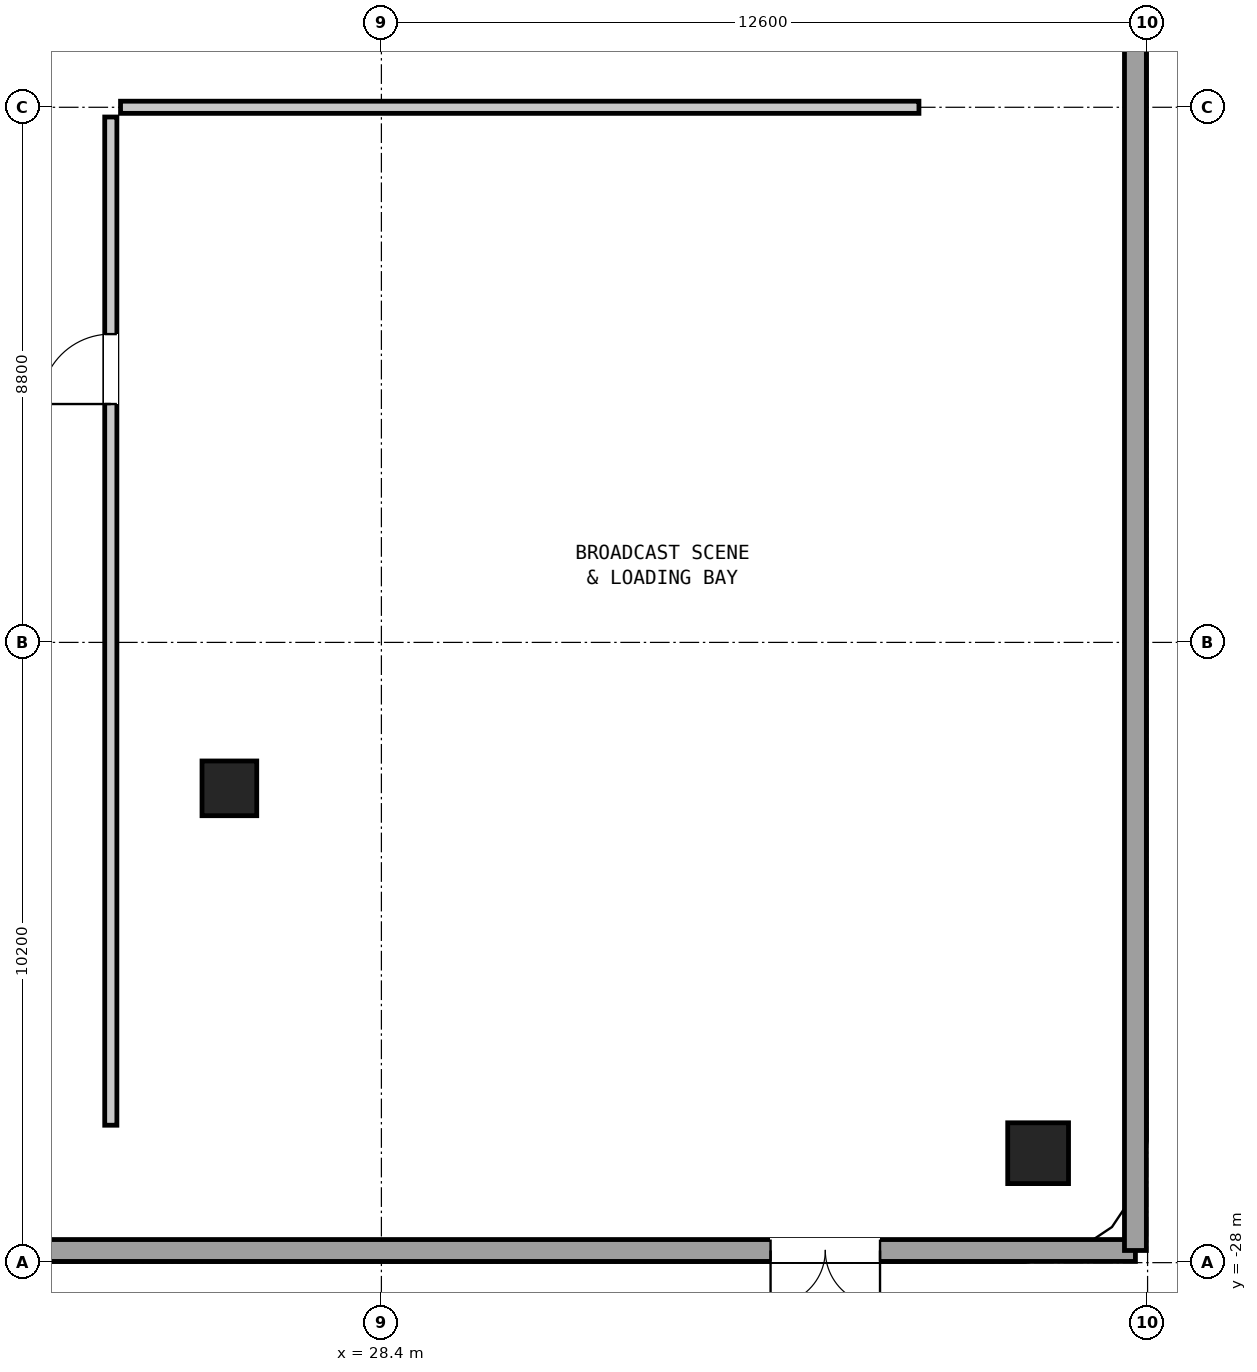
"""IFC4 building model, lengths in metres.
Left out: names, types, materials, properties, quantities, classifications, styles, units other than length and angle.
Written with IfcOpenShell. Run it as: python <this file> out.ifc"""

import sys

from ifc_helpers import new_model, si_unit, direction, frame, frame_2d, origin, origin_2d, place, context, subcontext, project, spatial, rectangle, hollow_rectangle, extrude, element, fill, save


model = new_model("IFC4")
c1 = context("Model", 3, precision=1e-05, world=origin(), true_north=direction((0.0, 1.0)))
c2 = subcontext(c1, "Body", "Model", "MODEL_VIEW")
j1 = project(units=[si_unit("LENGTHUNIT", "METRE"), si_unit("PLANEANGLEUNIT", "RADIAN")], contexts=[c1])
p1 = place(None, origin())
s1 = spatial("IfcSite", under=j1, at=p1, CompositionType="ELEMENT")
p2 = place(p1, origin())
s2 = spatial("IfcBuilding", under=s1, at=p2, CompositionType="ELEMENT")
p3 = place(p2, origin())
s3 = spatial("IfcBuildingStorey", under=s2, at=p3, CompositionType="ELEMENT", Elevation=0.0)
p4 = place(p3, frame((25.9, -20.2, 0.0), z_axis=(0.0, 0.0, 1.0), x_axis=(0.0, 1.0, 0.0)))
e1 = element("IfcColumn", 1, at=p4, inside=s3, PredefinedType="COLUMN", context=c2, shape_type="SweptSolid", body=[
    extrude(hollow_rectangle(XDim=0.9, YDim=0.9, WallThickness=0.055, at=origin_2d()), origin(), (0.0, 0.0, 1.0), 5.1),
])
p5 = place(p3, frame((39.2, -26.2, 0.0), z_axis=(0.0, 0.0, 1.0), x_axis=(1.0, 0.0, 0.0)))
e2 = element("IfcColumn", 2, at=p5, inside=s3, PredefinedType="COLUMN", context=c2, shape_type="SweptSolid", body=[
    extrude(rectangle(XDim=1.0, YDim=1.0, at=origin_2d()), origin(), (0.0, 0.0, 1.0), 5.1),
])
p6 = place(p3, frame((40.8, -27.8, 0.0), z_axis=(0.0, 0.0, 1.0), x_axis=(-1.0, 0.0, 0.0)))
e3 = element("IfcWall", 3, at=p6, inside=s3, PredefinedType="SOLIDWALL", context=c2, shape_type="SweptSolid", body=[
    extrude(rectangle(XDim=30.96, YDim=0.36, at=frame_2d((15.48, 0.0))), origin(), (0.0, 0.0, 1.0), 4.78),
])
p7 = place(p6, frame((4.2, 0.0, 0.0)))
e4 = element("IfcOpeningElement", 4, at=p7, cuts=e3, PredefinedType="OPENING", context=c2, shape_type="SweptSolid", body=[
    extrude(rectangle(XDim=1.8, YDim=2.4, at=frame_2d((0.9, 1.2))), frame((0.0, 0.192, 0.0), z_axis=(0.0, -1.0, 0.0), x_axis=(1.0, 0.0, 0.0)), (0.0, 0.0, 1.0), 0.384),
])
p8 = place(p6, frame((18.5, 0.0, 0.0)))
e5 = element("IfcOpeningElement", 5, at=p8, cuts=e3, PredefinedType="OPENING", context=c2, shape_type="SweptSolid", body=[
    extrude(rectangle(XDim=4.2, YDim=2.85, at=frame_2d((2.1, 1.425))), frame((0.0, 0.192, 0.0), z_axis=(0.0, -1.0, 0.0), x_axis=(1.0, 0.0, 0.0)), (0.0, 0.0, 1.0), 0.384),
])
p9 = place(p3, frame((40.8, -5.55, 0.0), z_axis=(0.0, 0.0, 1.0), x_axis=(0.0, -1.0, 0.0)))
e6 = element("IfcWall", 6, at=p9, inside=s3, PredefinedType="SOLIDWALL", context=c2, shape_type="SweptSolid", body=[
    extrude(rectangle(XDim=22.25, YDim=0.36, at=frame_2d((11.125, 0.0))), origin(), (0.0, 0.0, 1.0), 4.78),
])
p10 = place(p3, frame((23.95, -25.74, 0.0), z_axis=(0.0, 0.0, 1.0), x_axis=(0.0, 1.0, 0.0)))
e7 = element("IfcWall", 7, at=p10, inside=s3, PredefinedType="PARTITIONING", context=c2, shape_type="SweptSolid", body=[
    extrude(rectangle(XDim=16.58, YDim=0.2, at=frame_2d((8.29, 0.0))), origin(), (0.0, 0.0, 1.0), 4.78),
])
p11 = place(p10, frame((11.86, 0.0, 0.0)))
e8 = element("IfcOpeningElement", 8, at=p11, cuts=e7, PredefinedType="OPENING", context=c2, shape_type="SweptSolid", body=[
    extrude(rectangle(XDim=1.15, YDim=2.1, at=frame_2d((0.575, 1.05))), frame((0.0, 0.112, 0.0), z_axis=(0.0, -1.0, 0.0), x_axis=(1.0, 0.0, 0.0)), (0.0, 0.0, 1.0), 0.224),
])
p12 = place(p3, frame((24.11, -9.0, 0.0), z_axis=(0.0, 0.0, 1.0), x_axis=(1.0, 0.0, 0.0)))
e9 = element("IfcWall", 9, at=p12, inside=s3, PredefinedType="PARTITIONING", context=c2, shape_type="SweptSolid", body=[
    extrude(rectangle(XDim=13.13, YDim=0.2, at=frame_2d((6.565, 0.0))), origin(), (0.0, 0.0, 1.0), 3.642),
])
p13 = place(p7, origin())
e10 = element("IfcDoor", 10, at=p13, inside=s3, OperationType="DOUBLE_DOOR_SINGLE_SWING", PredefinedType="DOOR", context=c2, shape_type="SweptSolid", body=[
    extrude(rectangle(XDim=1.8, YDim=2.4, at=frame_2d((0.9, 1.2))), frame((0.0, 0.025, 0.0), z_axis=(0.0, -1.0, 0.0), x_axis=(1.0, 0.0, 0.0)), (0.0, 0.0, 1.0), 0.05),
])
fill(e4, e10)
p14 = place(p11, origin())
e11 = element("IfcDoor", 11, at=p14, inside=s3, OperationType="SINGLE_SWING_LEFT", PredefinedType="DOOR", context=c2, shape_type="SweptSolid", body=[
    extrude(rectangle(XDim=1.15, YDim=2.1, at=frame_2d((0.575, 1.05))), frame((0.0, 0.025, 0.0), z_axis=(0.0, -1.0, 0.0), x_axis=(1.0, 0.0, 0.0)), (0.0, 0.0, 1.0), 0.05),
])
fill(e8, e11)
save(model, sys.argv[1])
